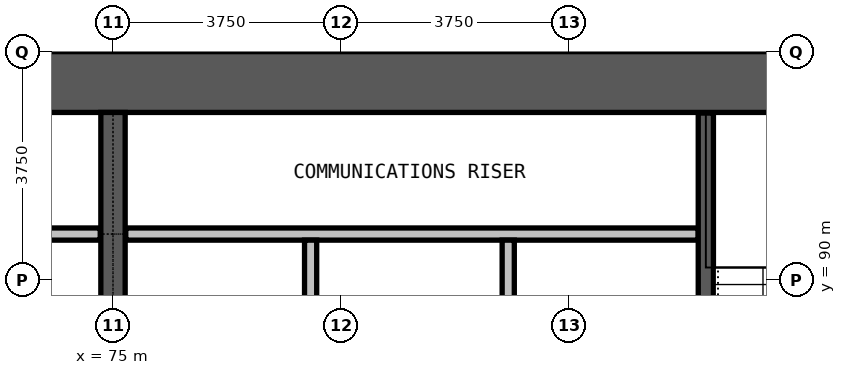
"""IFC4 building model, lengths in metres.
Left out: names, types, materials, properties, quantities, classifications, styles, units other than length and angle.
Written with IfcOpenShell. Run it as: python <this file> out.ifc"""

import sys

from ifc_helpers import new_model, si_unit, direction, frame, frame_2d, origin, place, context, subcontext, project, spatial, rectangle, extrude, element, save


model = new_model("IFC4")
c1 = context("Model", 3, precision=1e-05, world=origin(), true_north=direction((0.0, 1.0)))
c2 = subcontext(c1, "Body", "Model", "MODEL_VIEW")
j1 = project(units=[si_unit("LENGTHUNIT", "METRE"), si_unit("PLANEANGLEUNIT", "RADIAN")], contexts=[c1])
p1 = place(None, origin())
s1 = spatial("IfcSite", under=j1, at=p1, CompositionType="ELEMENT")
p2 = place(p1, origin())
s2 = spatial("IfcBuilding", under=s1, at=p2, CompositionType="ELEMENT")
p3 = place(p2, frame((0.0, 0.0, 258.5)))
s3 = spatial("IfcBuildingStorey", under=s2, at=p3, CompositionType="ELEMENT", Elevation=258.5)
p4 = place(p3, frame((90.0, 93.25, 0.0), z_axis=(0.0, 0.0, 1.0), x_axis=(-1.0, 0.0, 0.0)))
e1 = element("IfcWall", 1, at=p4, inside=s3, PredefinedType="SHEAR", context=c2, shape_type="SweptSolid", body=[
    extrude(rectangle(XDim=30.0, YDim=1.0, at=frame_2d((15.0, 0.0))), origin(), (0.0, 0.0, 1.0), 3.6),
])
p5 = place(p3, frame((75.0, 86.4, 0.0), z_axis=(0.0, 0.0, 1.0), x_axis=(0.0, 1.0, 0.0)))
e2 = element("IfcWall", 2, at=p5, inside=s3, PredefinedType="SHEAR", context=c2, shape_type="SweptSolid", body=[
    extrude(rectangle(XDim=6.35, YDim=0.4, at=frame_2d((3.175, 0.0))), origin(), (0.0, 0.0, 1.0), 3.6),
])
for number, where, z_axis, x_axis in (
    (3, (65.375, 90.75, 0.0), (0.0, 0.0, 1.0), (1.0, 0.0, 0.0)),
    (4, (75.21, 90.75, 0.0), (0.0, 0.0, 1.0), (1.0, 0.0, 0.0)),
):
    element("IfcWall", number, at=place(p3, frame(where, z_axis=z_axis, x_axis=x_axis)), inside=s3, PredefinedType="PARTITIONING", context=c2, shape_type="SweptSolid", body=[
        extrude(rectangle(XDim=9.415, YDim=0.2, at=frame_2d((4.708, 0.0))), origin(), (0.0, 0.0, 1.0), 3.3),
    ])
for number, where, z_axis, x_axis in (
    (5, (78.25, 86.85, 0.0), (0.0, 0.0, 1.0), (0.0, 1.0, 0.0)),
    (6, (81.5, 86.85, 0.0), (0.0, 0.0, 1.0), (0.0, 1.0, 0.0)),
):
    element("IfcWall", number, at=place(p3, frame(where, z_axis=z_axis, x_axis=x_axis)), inside=s3, PredefinedType="PARTITIONING", context=c2, shape_type="SweptSolid", body=[
        extrude(rectangle(XDim=3.8, YDim=0.2, at=frame_2d((1.9, 0.0))), origin(), (0.0, 0.0, 1.0), 3.3),
    ])
p6 = place(p3, frame((84.75, 85.625, 0.0), z_axis=(0.0, 0.0, 1.0), x_axis=(0.0, 1.0, 0.0)))
e7 = element("IfcWall", 7, at=p6, inside=s3, PredefinedType="PARTITIONING", context=c2, shape_type="SweptSolid", body=[
    extrude(rectangle(XDim=7.115, YDim=0.25, at=frame_2d((3.558, 0.0))), origin(), (0.0, 0.0, 1.0), 3.3),
])
save(model, sys.argv[1])
